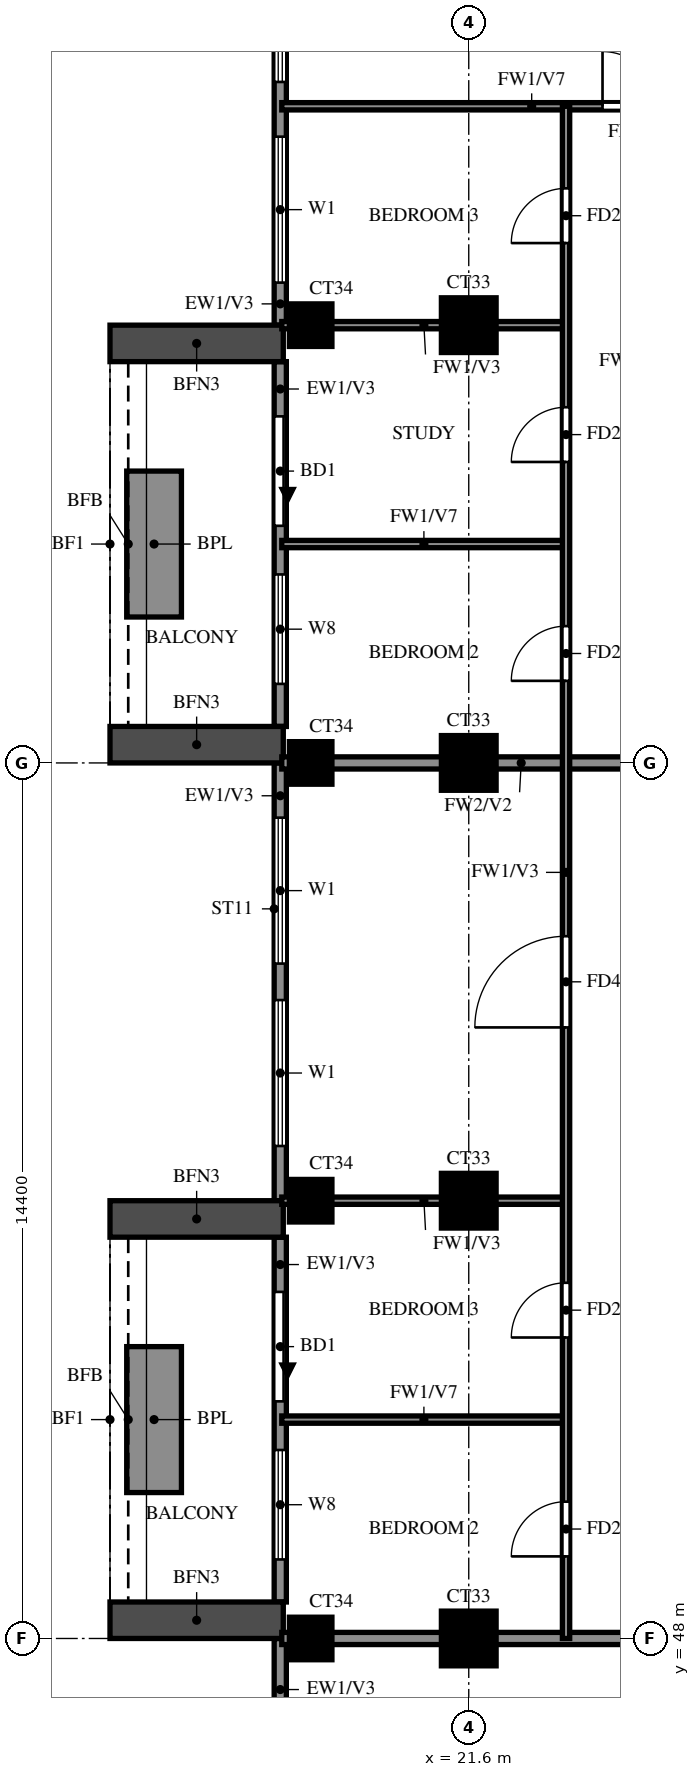
"""IFC4 building model, lengths in metres.
Left out: names, types, materials, properties, quantities, classifications, styles, units other than length and angle.
Written with IfcOpenShell. Run it as: python <this file> out.ifc"""

import sys

from ifc_helpers import new_model, si_unit, direction, frame, frame_2d, origin, origin_2d, place, context, subcontext, project, spatial, rectangle, extrude, source, transform, mapped, element, fill, save


model = new_model("IFC4")
c1 = context("Model", 3, precision=1e-05, world=origin(), true_north=direction((0.0, 1.0)))
c2 = subcontext(c1, "Body", "Model", "MODEL_VIEW")
j1 = project(units=[si_unit("LENGTHUNIT", "METRE"), si_unit("PLANEANGLEUNIT", "RADIAN")], contexts=[c1])
p1 = place(None, origin())
s1 = spatial("IfcSite", under=j1, at=p1, CompositionType="ELEMENT")
p2 = place(p1, origin())
s2 = spatial("IfcBuilding", under=s1, at=p2, CompositionType="ELEMENT")
p3 = place(p2, frame((0.0, 0.0, 225.5)))
s3 = spatial("IfcBuildingStorey", under=s2, at=p3, CompositionType="ELEMENT", Elevation=225.5)
m1 = source(origin(), c2, "Body", "SweptSolid", [
    extrude(rectangle(XDim=0.7, YDim=0.7, at=origin_2d()), origin(), (0.0, 0.0, 1.0), 3.22),
])
p4 = place(p3, frame((19.0, 48.0, 0.0), z_axis=(0.0, 0.0, 1.0), x_axis=(1.0, 0.0, 0.0)))
e1 = element("IfcColumn", 1, at=p4, inside=s3, PredefinedType="COLUMN", context=c2, shape_type="MappedRepresentation", body=[
    mapped(m1, transform((0.0, 0.0, 0.0))),
])
m2 = source(origin(), c2, "Body", "SweptSolid", [
    extrude(rectangle(XDim=0.9, YDim=0.9, at=origin_2d()), origin(), (0.0, 0.0, 1.0), 3.22),
])
p5 = place(p3, frame((21.6, 48.0, 0.0), z_axis=(0.0, 0.0, 1.0), x_axis=(1.0, 0.0, 0.0)))
e2 = element("IfcColumn", 2, at=p5, inside=s3, PredefinedType="COLUMN", context=c2, shape_type="MappedRepresentation", body=[
    mapped(m2, transform((0.0, 0.0, 0.0))),
])
p6 = place(p3, frame((19.0, 55.2, 0.0), z_axis=(0.0, 0.0, 1.0), x_axis=(1.0, 0.0, 0.0)))
e3 = element("IfcColumn", 3, at=p6, inside=s3, PredefinedType="COLUMN", context=c2, shape_type="MappedRepresentation", body=[
    mapped(m1, transform((0.0, 0.0, 0.0))),
])
p7 = place(p3, frame((21.6, 55.2, 0.0), z_axis=(0.0, 0.0, 1.0), x_axis=(1.0, 0.0, 0.0)))
e4 = element("IfcColumn", 4, at=p7, inside=s3, PredefinedType="COLUMN", context=c2, shape_type="MappedRepresentation", body=[
    mapped(m2, transform((0.0, 0.0, 0.0))),
])
p8 = place(p3, frame((19.0, 62.4, 0.0), z_axis=(0.0, 0.0, 1.0), x_axis=(1.0, 0.0, 0.0)))
e5 = element("IfcColumn", 5, at=p8, inside=s3, PredefinedType="COLUMN", context=c2, shape_type="MappedRepresentation", body=[
    mapped(m1, transform((0.0, 0.0, 0.0))),
])
p9 = place(p3, frame((21.6, 62.4, 0.0), z_axis=(0.0, 0.0, 1.0), x_axis=(1.0, 0.0, 0.0)))
e6 = element("IfcColumn", 6, at=p9, inside=s3, PredefinedType="COLUMN", context=c2, shape_type="MappedRepresentation", body=[
    mapped(m2, transform((0.0, 0.0, 0.0))),
])
p10 = place(p3, frame((19.0, 69.6, 0.0), z_axis=(0.0, 0.0, 1.0), x_axis=(1.0, 0.0, 0.0)))
e7 = element("IfcColumn", 7, at=p10, inside=s3, PredefinedType="COLUMN", context=c2, shape_type="MappedRepresentation", body=[
    mapped(m1, transform((0.0, 0.0, 0.0))),
])
p11 = place(p3, frame((21.6, 69.6, 0.0), z_axis=(0.0, 0.0, 1.0), x_axis=(1.0, 0.0, 0.0)))
e8 = element("IfcColumn", 8, at=p11, inside=s3, PredefinedType="COLUMN", context=c2, shape_type="MappedRepresentation", body=[
    mapped(m2, transform((0.0, 0.0, 0.0))),
])
p12 = place(p3, frame((18.5, 76.6, 0.0), z_axis=(0.0, 0.0, 1.0), x_axis=(0.0, -1.0, 0.0)))
e9 = element("IfcWall", 9, at=p12, inside=s3, PredefinedType="SOLIDWALL", context=c2, shape_type="SweptSolid", body=[
    extrude(rectangle(XDim=7.0, YDim=0.2, at=frame_2d((3.5, 0.0))), origin(), (0.0, 0.0, 1.0), 3.22),
])
p13 = place(p12, frame((3.9, 0.0, 0.6)))
e10 = element("IfcOpeningElement", 10, at=p13, cuts=e9, PredefinedType="OPENING", context=c2, shape_type="SweptSolid", body=[
    extrude(rectangle(XDim=2.4, YDim=2.4, at=frame_2d((1.2, 1.2))), frame((0.0, 0.11, 0.0), z_axis=(0.0, -1.0, 0.0), x_axis=(1.0, 0.0, 0.0)), (0.0, 0.0, 1.0), 0.22),
])
p14 = place(p12, frame((0.6, 0.0, 0.6)))
e11 = element("IfcOpeningElement", 11, at=p14, cuts=e9, PredefinedType="OPENING", context=c2, shape_type="SweptSolid", body=[
    extrude(rectangle(XDim=2.4, YDim=2.4, at=frame_2d((1.2, 1.2))), frame((0.0, 0.11, 0.0), z_axis=(0.0, -1.0, 0.0), x_axis=(1.0, 0.0, 0.0)), (0.0, 0.0, 1.0), 0.22),
])
p15 = place(p3, frame((18.5, 69.0, 0.0), z_axis=(0.0, 0.0, 1.0), x_axis=(0.0, -1.0, 0.0)))
e12 = element("IfcWall", 12, at=p15, inside=s3, PredefinedType="SOLIDWALL", context=c2, shape_type="SweptSolid", body=[
    extrude(rectangle(XDim=6.0, YDim=0.2, at=frame_2d((3.0, 0.0))), origin(), (0.0, 0.0, 1.0), 3.22),
])
p16 = place(p15, frame((0.9, 0.0, 0.0)))
e13 = element("IfcOpeningElement", 13, at=p16, cuts=e12, PredefinedType="OPENING", context=c2, shape_type="SweptSolid", body=[
    extrude(rectangle(XDim=1.8, YDim=2.4, at=frame_2d((0.9, 1.2))), frame((0.0, 0.11, 0.0), z_axis=(0.0, -1.0, 0.0), x_axis=(1.0, 0.0, 0.0)), (0.0, 0.0, 1.0), 0.22),
])
p17 = place(p15, frame((3.5, 0.0, 0.6)))
e14 = element("IfcOpeningElement", 14, at=p17, cuts=e12, PredefinedType="OPENING", context=c2, shape_type="SweptSolid", body=[
    extrude(rectangle(XDim=1.8, YDim=2.4, at=frame_2d((0.9, 1.2))), frame((0.0, 0.11, 0.0), z_axis=(0.0, -1.0, 0.0), x_axis=(1.0, 0.0, 0.0)), (0.0, 0.0, 1.0), 0.22),
])
p18 = place(p3, frame((18.5, 62.4, 0.0), z_axis=(0.0, 0.0, 1.0), x_axis=(0.0, -1.0, 0.0)))
e15 = element("IfcWall", 15, at=p18, inside=s3, PredefinedType="SOLIDWALL", context=c2, shape_type="SweptSolid", body=[
    extrude(rectangle(XDim=7.2, YDim=0.2, at=frame_2d((3.6, 0.0))), origin(), (0.0, 0.0, 1.0), 3.22),
])
p19 = place(p18, frame((0.9, 0.0, 0.6)))
e16 = element("IfcOpeningElement", 16, at=p19, cuts=e15, PredefinedType="OPENING", context=c2, shape_type="SweptSolid", body=[
    extrude(rectangle(XDim=2.4, YDim=2.4, at=frame_2d((1.2, 1.2))), frame((0.0, 0.11, 0.0), z_axis=(0.0, -1.0, 0.0), x_axis=(1.0, 0.0, 0.0)), (0.0, 0.0, 1.0), 0.22),
])
p20 = place(p18, frame((3.9, 0.0, 0.6)))
e17 = element("IfcOpeningElement", 17, at=p20, cuts=e15, PredefinedType="OPENING", context=c2, shape_type="SweptSolid", body=[
    extrude(rectangle(XDim=2.4, YDim=2.4, at=frame_2d((1.2, 1.2))), frame((0.0, 0.11, 0.0), z_axis=(0.0, -1.0, 0.0), x_axis=(1.0, 0.0, 0.0)), (0.0, 0.0, 1.0), 0.22),
])
p21 = place(p3, frame((18.5, 54.6, 0.0), z_axis=(0.0, 0.0, 1.0), x_axis=(0.0, -1.0, 0.0)))
e18 = element("IfcWall", 18, at=p21, inside=s3, PredefinedType="SOLIDWALL", context=c2, shape_type="SweptSolid", body=[
    extrude(rectangle(XDim=6.0, YDim=0.2, at=frame_2d((3.0, 0.0))), origin(), (0.0, 0.0, 1.0), 3.22),
])
p22 = place(p21, frame((0.9, 0.0, 0.0)))
e19 = element("IfcOpeningElement", 19, at=p22, cuts=e18, PredefinedType="OPENING", context=c2, shape_type="SweptSolid", body=[
    extrude(rectangle(XDim=1.8, YDim=2.4, at=frame_2d((0.9, 1.2))), frame((0.0, 0.11, 0.0), z_axis=(0.0, -1.0, 0.0), x_axis=(1.0, 0.0, 0.0)), (0.0, 0.0, 1.0), 0.22),
])
p23 = place(p21, frame((3.5, 0.0, 0.6)))
e20 = element("IfcOpeningElement", 20, at=p23, cuts=e18, PredefinedType="OPENING", context=c2, shape_type="SweptSolid", body=[
    extrude(rectangle(XDim=1.8, YDim=2.4, at=frame_2d((0.9, 1.2))), frame((0.0, 0.11, 0.0), z_axis=(0.0, -1.0, 0.0), x_axis=(1.0, 0.0, 0.0)), (0.0, 0.0, 1.0), 0.22),
])
p24 = place(p3, frame((18.5, 48.0, 0.0), z_axis=(0.0, 0.0, 1.0), x_axis=(0.0, -1.0, 0.0)))
e21 = element("IfcWall", 21, at=p24, inside=s3, PredefinedType="SOLIDWALL", context=c2, shape_type="SweptSolid", body=[
    extrude(rectangle(XDim=4.8, YDim=0.2, at=frame_2d((2.4, 0.0))), origin(), (0.0, 0.0, 1.0), 3.22),
])
p25 = place(p24, frame((1.2, 0.0, 0.6)))
e22 = element("IfcOpeningElement", 22, at=p25, cuts=e21, PredefinedType="OPENING", context=c2, shape_type="SweptSolid", body=[
    extrude(rectangle(XDim=2.4, YDim=2.4, at=frame_2d((1.2, 1.2))), frame((0.0, 0.11, 0.0), z_axis=(0.0, -1.0, 0.0), x_axis=(1.0, 0.0, 0.0)), (0.0, 0.0, 1.0), 0.22),
])
for number, where, z_axis, x_axis in (
    (23, (18.55, 69.3, 0.0), (0.0, 0.0, 1.0), (-1.0, 0.0, 0.0)),
    (24, (18.55, 62.7, 0.0), (0.0, 0.0, 1.0), (-1.0, 0.0, 0.0)),
):
    element("IfcWall", number, at=place(p3, frame(where, z_axis=z_axis, x_axis=x_axis)), inside=s3, PredefinedType="SOLIDWALL", context=c2, shape_type="SweptSolid", body=[
        extrude(rectangle(XDim=2.85, YDim=0.6, at=frame_2d((1.425, 0.0))), origin(), (0.0, 0.0, 1.0), 2.85),
    ])
p26 = place(p3, frame((16.425, 67.2, 0.0), z_axis=(0.0, 0.0, 1.0), x_axis=(0.0, -1.0, 0.0)))
e25 = element("IfcWall", 25, at=p26, inside=s3, PredefinedType="SOLIDWALL", context=c2, shape_type="SweptSolid", body=[
    extrude(rectangle(XDim=2.4, YDim=0.9, at=frame_2d((1.2, 0.0))), origin(), (0.0, 0.0, 1.0), 0.9),
])
for number, where, z_axis, x_axis in (
    (26, (18.55, 54.9, 0.0), (0.0, 0.0, 1.0), (-1.0, 0.0, 0.0)),
    (27, (18.55, 48.3, 0.0), (0.0, 0.0, 1.0), (-1.0, 0.0, 0.0)),
):
    element("IfcWall", number, at=place(p3, frame(where, z_axis=z_axis, x_axis=x_axis)), inside=s3, PredefinedType="SOLIDWALL", context=c2, shape_type="SweptSolid", body=[
        extrude(rectangle(XDim=2.85, YDim=0.6, at=frame_2d((1.425, 0.0))), origin(), (0.0, 0.0, 1.0), 2.85),
    ])
p27 = place(p3, frame((16.425, 52.8, 0.0), z_axis=(0.0, 0.0, 1.0), x_axis=(0.0, -1.0, 0.0)))
e28 = element("IfcWall", 28, at=p27, inside=s3, PredefinedType="SOLIDWALL", context=c2, shape_type="SweptSolid", body=[
    extrude(rectangle(XDim=2.4, YDim=0.9, at=frame_2d((1.2, 0.0))), origin(), (0.0, 0.0, 1.0), 0.9),
])
p28 = place(p3, frame((18.525, 48.0, 0.0), z_axis=(0.0, 0.0, 1.0), x_axis=(1.0, 0.0, 0.0)))
e29 = element("IfcWall", 29, at=p28, inside=s3, PredefinedType="SOLIDWALL", context=c2, shape_type="SweptSolid", body=[
    extrude(rectangle(XDim=15.075, YDim=0.2, at=frame_2d((7.538, 0.0))), origin(), (0.0, 0.0, 1.0), 3.22),
])
p29 = place(p3, frame((18.525, 62.4, 0.0), z_axis=(0.0, 0.0, 1.0), x_axis=(1.0, 0.0, 0.0)))
e30 = element("IfcWall", 30, at=p29, inside=s3, PredefinedType="SOLIDWALL", context=c2, shape_type="SweptSolid", body=[
    extrude(rectangle(XDim=7.875, YDim=0.2, at=frame_2d((3.938, 0.0))), origin(), (0.0, 0.0, 1.0), 3.22),
])
p30 = place(p3, frame((18.525, 51.6, 0.0), z_axis=(0.0, 0.0, 1.0), x_axis=(1.0, 0.0, 0.0)))
e31 = element("IfcWall", 31, at=p30, inside=s3, PredefinedType="PARTITIONING", context=c2, shape_type="SweptSolid", body=[
    extrude(rectangle(XDim=4.675, YDim=0.12, at=frame_2d((2.337, 0.0))), origin(), (0.0, 0.0, 1.0), 2.32),
])
p31 = place(p3, frame((18.525, 55.2, 0.0), z_axis=(0.0, 0.0, 1.0), x_axis=(1.0, 0.0, 0.0)))
e32 = element("IfcWall", 32, at=p31, inside=s3, PredefinedType="PARTITIONING", context=c2, shape_type="SweptSolid", body=[
    extrude(rectangle(XDim=4.675, YDim=0.12, at=frame_2d((2.337, 0.0))), origin(), (0.0, 0.0, 1.0), 3.22),
])
p32 = place(p3, frame((18.525, 66.0, 0.0), z_axis=(0.0, 0.0, 1.0), x_axis=(1.0, 0.0, 0.0)))
e33 = element("IfcWall", 33, at=p32, inside=s3, PredefinedType="PARTITIONING", context=c2, shape_type="SweptSolid", body=[
    extrude(rectangle(XDim=4.675, YDim=0.12, at=frame_2d((2.337, 0.0))), origin(), (0.0, 0.0, 1.0), 2.32),
])
p33 = place(p3, frame((18.525, 69.6, 0.0), z_axis=(0.0, 0.0, 1.0), x_axis=(1.0, 0.0, 0.0)))
e34 = element("IfcWall", 34, at=p33, inside=s3, PredefinedType="PARTITIONING", context=c2, shape_type="SweptSolid", body=[
    extrude(rectangle(XDim=4.675, YDim=0.12, at=frame_2d((2.337, 0.0))), origin(), (0.0, 0.0, 1.0), 3.22),
])
p34 = place(p3, frame((18.525, 73.2, 0.0), z_axis=(0.0, 0.0, 1.0), x_axis=(1.0, 0.0, 0.0)))
e35 = element("IfcWall", 35, at=p34, inside=s3, PredefinedType="PARTITIONING", context=c2, shape_type="SweptSolid", body=[
    extrude(rectangle(XDim=10.275, YDim=0.12, at=frame_2d((5.138, 0.0))), origin(), (0.0, 0.0, 1.0), 2.32),
])
p35 = place(p34, frame((5.275, 0.0, 0.0)))
e36 = element("IfcOpeningElement", 36, at=p35, cuts=e35, PredefinedType="OPENING", context=c2, shape_type="SweptSolid", body=[
    extrude(rectangle(XDim=0.9, YDim=2.1, at=frame_2d((0.45, 1.05))), frame((0.0, 0.07, 0.0), z_axis=(0.0, -1.0, 0.0), x_axis=(1.0, 0.0, 0.0)), (0.0, 0.0, 1.0), 0.14),
])
p36 = place(p3, frame((23.2, 48.0, 0.0), z_axis=(0.0, 0.0, 1.0), x_axis=(0.0, 1.0, 0.0)))
e37 = element("IfcWall", 37, at=p36, inside=s3, PredefinedType="PARTITIONING", context=c2, shape_type="SweptSolid", body=[
    extrude(rectangle(XDim=25.2, YDim=0.12, at=frame_2d((12.6, 0.0))), origin(), (0.0, 0.0, 1.0), 3.22),
])
p37 = place(p36, frame((1.35, 0.0, 0.0)))
e38 = element("IfcOpeningElement", 38, at=p37, cuts=e37, PredefinedType="OPENING", context=c2, shape_type="SweptSolid", body=[
    extrude(rectangle(XDim=0.9, YDim=2.1, at=frame_2d((0.45, 1.05))), frame((0.0, 0.07, 0.0), z_axis=(0.0, -1.0, 0.0), x_axis=(1.0, 0.0, 0.0)), (0.0, 0.0, 1.0), 0.14),
])
p38 = place(p36, frame((4.95, 0.0, 0.0)))
e39 = element("IfcOpeningElement", 39, at=p38, cuts=e37, PredefinedType="OPENING", context=c2, shape_type="SweptSolid", body=[
    extrude(rectangle(XDim=0.9, YDim=2.1, at=frame_2d((0.45, 1.05))), frame((0.0, 0.07, 0.0), z_axis=(0.0, -1.0, 0.0), x_axis=(1.0, 0.0, 0.0)), (0.0, 0.0, 1.0), 0.14),
])
p39 = place(p36, frame((10.05, 0.0, 0.0)))
e40 = element("IfcOpeningElement", 40, at=p39, cuts=e37, PredefinedType="OPENING", context=c2, shape_type="SweptSolid", body=[
    extrude(rectangle(XDim=1.5, YDim=2.1, at=frame_2d((0.75, 1.05))), frame((0.0, 0.07, 0.0), z_axis=(0.0, -1.0, 0.0), x_axis=(1.0, 0.0, 0.0)), (0.0, 0.0, 1.0), 0.14),
])
p40 = place(p36, frame((15.75, 0.0, 0.0)))
e41 = element("IfcOpeningElement", 41, at=p40, cuts=e37, PredefinedType="OPENING", context=c2, shape_type="SweptSolid", body=[
    extrude(rectangle(XDim=0.9, YDim=2.1, at=frame_2d((0.45, 1.05))), frame((0.0, 0.07, 0.0), z_axis=(0.0, -1.0, 0.0), x_axis=(1.0, 0.0, 0.0)), (0.0, 0.0, 1.0), 0.14),
])
p41 = place(p36, frame((19.35, 0.0, 0.0)))
e42 = element("IfcOpeningElement", 42, at=p41, cuts=e37, PredefinedType="OPENING", context=c2, shape_type="SweptSolid", body=[
    extrude(rectangle(XDim=0.9, YDim=2.1, at=frame_2d((0.45, 1.05))), frame((0.0, 0.07, 0.0), z_axis=(0.0, -1.0, 0.0), x_axis=(1.0, 0.0, 0.0)), (0.0, 0.0, 1.0), 0.14),
])
p42 = place(p36, frame((22.95, 0.0, 0.0)))
e43 = element("IfcOpeningElement", 43, at=p42, cuts=e37, PredefinedType="OPENING", context=c2, shape_type="SweptSolid", body=[
    extrude(rectangle(XDim=0.9, YDim=2.1, at=frame_2d((0.45, 1.05))), frame((0.0, 0.07, 0.0), z_axis=(0.0, -1.0, 0.0), x_axis=(1.0, 0.0, 0.0)), (0.0, 0.0, 1.0), 0.14),
])
p43 = place(p13, origin())
e44 = element("IfcWindow", 44, at=p43, inside=s3, PartitioningType="DOUBLE_PANEL_VERTICAL", PredefinedType="WINDOW", context=c2, shape_type="SweptSolid", body=[
    extrude(rectangle(XDim=2.4, YDim=2.4, at=frame_2d((1.2, 1.2))), frame((0.0, 0.03, 0.0), z_axis=(0.0, -1.0, 0.0), x_axis=(1.0, 0.0, 0.0)), (0.0, 0.0, 1.0), 0.06),
])
fill(e10, e44)
p44 = place(p14, origin())
e45 = element("IfcWindow", 45, at=p44, inside=s3, PartitioningType="DOUBLE_PANEL_VERTICAL", PredefinedType="WINDOW", context=c2, shape_type="SweptSolid", body=[
    extrude(rectangle(XDim=2.4, YDim=2.4, at=frame_2d((1.2, 1.2))), frame((0.0, 0.03, 0.0), z_axis=(0.0, -1.0, 0.0), x_axis=(1.0, 0.0, 0.0)), (0.0, 0.0, 1.0), 0.06),
])
fill(e11, e45)
p45 = place(p16, origin())
e46 = element("IfcDoor", 46, at=p45, inside=s3, OperationType="DOUBLE_DOOR_SLIDING", PredefinedType="DOOR", context=c2, shape_type="SweptSolid", body=[
    extrude(rectangle(XDim=1.8, YDim=2.4, at=frame_2d((0.9, 1.2))), frame((0.0, 0.025, 0.0), z_axis=(0.0, -1.0, 0.0), x_axis=(1.0, 0.0, 0.0)), (0.0, 0.0, 1.0), 0.05),
])
fill(e13, e46)
p46 = place(p17, origin())
e47 = element("IfcWindow", 47, at=p46, inside=s3, PartitioningType="DOUBLE_PANEL_VERTICAL", PredefinedType="WINDOW", context=c2, shape_type="SweptSolid", body=[
    extrude(rectangle(XDim=1.8, YDim=2.4, at=frame_2d((0.9, 1.2))), frame((0.0, 0.03, 0.0), z_axis=(0.0, -1.0, 0.0), x_axis=(1.0, 0.0, 0.0)), (0.0, 0.0, 1.0), 0.06),
])
fill(e14, e47)
p47 = place(p19, origin())
e48 = element("IfcWindow", 48, at=p47, inside=s3, PartitioningType="DOUBLE_PANEL_VERTICAL", PredefinedType="WINDOW", context=c2, shape_type="SweptSolid", body=[
    extrude(rectangle(XDim=2.4, YDim=2.4, at=frame_2d((1.2, 1.2))), frame((0.0, 0.03, 0.0), z_axis=(0.0, -1.0, 0.0), x_axis=(1.0, 0.0, 0.0)), (0.0, 0.0, 1.0), 0.06),
])
fill(e16, e48)
p48 = place(p20, origin())
e49 = element("IfcWindow", 49, at=p48, inside=s3, PartitioningType="DOUBLE_PANEL_VERTICAL", PredefinedType="WINDOW", context=c2, shape_type="SweptSolid", body=[
    extrude(rectangle(XDim=2.4, YDim=2.4, at=frame_2d((1.2, 1.2))), frame((0.0, 0.03, 0.0), z_axis=(0.0, -1.0, 0.0), x_axis=(1.0, 0.0, 0.0)), (0.0, 0.0, 1.0), 0.06),
])
fill(e17, e49)
p49 = place(p22, origin())
e50 = element("IfcDoor", 50, at=p49, inside=s3, OperationType="DOUBLE_DOOR_SLIDING", PredefinedType="DOOR", context=c2, shape_type="SweptSolid", body=[
    extrude(rectangle(XDim=1.8, YDim=2.4, at=frame_2d((0.9, 1.2))), frame((0.0, 0.025, 0.0), z_axis=(0.0, -1.0, 0.0), x_axis=(1.0, 0.0, 0.0)), (0.0, 0.0, 1.0), 0.05),
])
fill(e19, e50)
p50 = place(p23, origin())
e51 = element("IfcWindow", 51, at=p50, inside=s3, PartitioningType="DOUBLE_PANEL_VERTICAL", PredefinedType="WINDOW", context=c2, shape_type="SweptSolid", body=[
    extrude(rectangle(XDim=1.8, YDim=2.4, at=frame_2d((0.9, 1.2))), frame((0.0, 0.03, 0.0), z_axis=(0.0, -1.0, 0.0), x_axis=(1.0, 0.0, 0.0)), (0.0, 0.0, 1.0), 0.06),
])
fill(e20, e51)
p51 = place(p37, origin())
e52 = element("IfcDoor", 52, at=p51, inside=s3, OperationType="SINGLE_SWING_LEFT", PredefinedType="DOOR", context=c2, shape_type="SweptSolid", body=[
    extrude(rectangle(XDim=0.9, YDim=2.1, at=frame_2d((0.45, 1.05))), frame((0.0, 0.025, 0.0), z_axis=(0.0, -1.0, 0.0), x_axis=(1.0, 0.0, 0.0)), (0.0, 0.0, 1.0), 0.05),
])
fill(e38, e52)
p52 = place(p38, origin())
e53 = element("IfcDoor", 53, at=p52, inside=s3, OperationType="SINGLE_SWING_RIGHT", PredefinedType="DOOR", context=c2, shape_type="SweptSolid", body=[
    extrude(rectangle(XDim=0.9, YDim=2.1, at=frame_2d((0.45, 1.05))), frame((0.0, 0.025, 0.0), z_axis=(0.0, -1.0, 0.0), x_axis=(1.0, 0.0, 0.0)), (0.0, 0.0, 1.0), 0.05),
])
fill(e39, e53)
p53 = place(p39, origin())
e54 = element("IfcDoor", 54, at=p53, inside=s3, OperationType="SINGLE_SWING_LEFT", PredefinedType="DOOR", context=c2, shape_type="SweptSolid", body=[
    extrude(rectangle(XDim=1.5, YDim=2.1, at=frame_2d((0.75, 1.05))), frame((0.0, 0.025, 0.0), z_axis=(0.0, -1.0, 0.0), x_axis=(1.0, 0.0, 0.0)), (0.0, 0.0, 1.0), 0.05),
])
fill(e40, e54)
p54 = place(p40, origin())
e55 = element("IfcDoor", 55, at=p54, inside=s3, OperationType="SINGLE_SWING_LEFT", PredefinedType="DOOR", context=c2, shape_type="SweptSolid", body=[
    extrude(rectangle(XDim=0.9, YDim=2.1, at=frame_2d((0.45, 1.05))), frame((0.0, 0.025, 0.0), z_axis=(0.0, -1.0, 0.0), x_axis=(1.0, 0.0, 0.0)), (0.0, 0.0, 1.0), 0.05),
])
fill(e41, e55)
p55 = place(p41, origin())
e56 = element("IfcDoor", 56, at=p55, inside=s3, OperationType="SINGLE_SWING_LEFT", PredefinedType="DOOR", context=c2, shape_type="SweptSolid", body=[
    extrude(rectangle(XDim=0.9, YDim=2.1, at=frame_2d((0.45, 1.05))), frame((0.0, 0.025, 0.0), z_axis=(0.0, -1.0, 0.0), x_axis=(1.0, 0.0, 0.0)), (0.0, 0.0, 1.0), 0.05),
])
fill(e42, e56)
p56 = place(p42, origin())
e57 = element("IfcDoor", 57, at=p56, inside=s3, OperationType="SINGLE_SWING_RIGHT", PredefinedType="DOOR", context=c2, shape_type="SweptSolid", body=[
    extrude(rectangle(XDim=0.9, YDim=2.1, at=frame_2d((0.45, 1.05))), frame((0.0, 0.025, 0.0), z_axis=(0.0, -1.0, 0.0), x_axis=(1.0, 0.0, 0.0)), (0.0, 0.0, 1.0), 0.05),
])
fill(e43, e57)
p57 = place(p35, origin())
e58 = element("IfcDoor", 58, at=p57, inside=s3, OperationType="SINGLE_SWING_LEFT", PredefinedType="DOOR", context=c2, shape_type="SweptSolid", body=[
    extrude(rectangle(XDim=0.9, YDim=2.1, at=frame_2d((0.45, 1.05))), frame((0.0, 0.025, 0.0), z_axis=(0.0, -1.0, 0.0), x_axis=(1.0, 0.0, 0.0)), (0.0, 0.0, 1.0), 0.05),
])
fill(e36, e58)
save(model, sys.argv[1])
